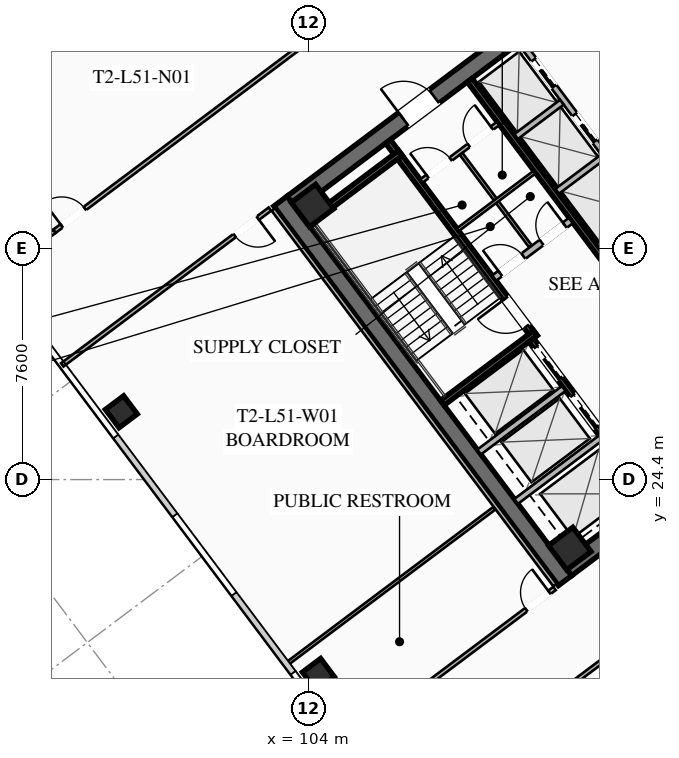
"""IFC4 building model, lengths in metres.
Left out: names, types, materials, properties, quantities, classifications, styles, units other than length and angle.
Written with IfcOpenShell. Run it as: python <this file> out.ifc"""

import sys

from ifc_helpers import new_model, si_unit, direction, frame, frame_2d, origin, origin_2d, place, context, subcontext, project, spatial, rectangle, hollow_rectangle, extrude, element, fill, save


model = new_model("IFC4")
c1 = context("Model", 3, precision=1e-05, world=origin(), true_north=direction((0.0, 1.0)))
c2 = subcontext(c1, "Body", "Model", "MODEL_VIEW")
j1 = project(units=[si_unit("LENGTHUNIT", "METRE"), si_unit("PLANEANGLEUNIT", "RADIAN")], contexts=[c1])
p1 = place(None, origin())
s1 = spatial("IfcSite", under=j1, at=p1, CompositionType="ELEMENT")
p2 = place(p1, origin())
s2 = spatial("IfcBuilding", under=s1, at=p2, CompositionType="ELEMENT")
p3 = place(p2, frame((0.0, 0.0, 188.95)))
s3 = spatial("IfcBuildingStorey", under=s2, at=p3, CompositionType="ELEMENT", Elevation=188.95)
p4 = place(p3, frame((112.436, 21.077, 0.0), z_axis=(0.0, 0.0, 1.0), x_axis=(-0.600005007985, 0.799996243986, 0.0)))
e1 = element("IfcWall", 1, at=p4, inside=s3, PredefinedType="SHEAR", context=c2, shape_type="SweptSolid", body=[
    extrude(rectangle(XDim=15.6, YDim=0.55, at=frame_2d((7.8, 0.0))), origin(), (0.0, 0.0, 1.0), 3.55),
])
p5 = place(p3, frame((124.539, 30.498, 0.0), z_axis=(0.0, 0.0, 1.0), x_axis=(-0.799998054672, -0.600002593761, 0.0)))
e2 = element("IfcWall", 2, at=p5, inside=s3, PredefinedType="SHEAR", context=c2, shape_type="SweptSolid", body=[
    extrude(rectangle(XDim=15.06, YDim=0.55, at=frame_2d((7.53, 0.0))), origin(), (0.0, 0.0, 1.0), 3.55),
])
p6 = place(p5, frame((9.23, 0.0, 0.0)))
e3 = element("IfcOpeningElement", 3, at=p6, cuts=e2, PredefinedType="OPENING", context=c2, shape_type="SweptSolid", body=[
    extrude(rectangle(XDim=1.25, YDim=2.25, at=frame_2d((0.625, 1.125))), frame((0.0, 0.285, 0.0), z_axis=(0.0, -1.0, 0.0), x_axis=(1.0, 0.0, 0.0)), (0.0, 0.0, 1.0), 0.57),
])
p7 = place(p5, frame((4.18, 0.0, 0.0)))
e4 = element("IfcOpeningElement", 4, at=p7, cuts=e2, PredefinedType="OPENING", context=c2, shape_type="SweptSolid", body=[
    extrude(rectangle(XDim=1.25, YDim=2.25, at=frame_2d((0.625, 1.125))), frame((0.0, 0.285, 0.0), z_axis=(0.0, -1.0, 0.0), x_axis=(1.0, 0.0, 0.0)), (0.0, 0.0, 1.0), 0.57),
])
p8 = place(p3, frame((103.461, 33.502, 0.0), z_axis=(0.0, 0.0, 1.0), x_axis=(0.799998054672, 0.600002593761, 0.0)))
e5 = element("IfcWall", 5, at=p8, inside=s3, PredefinedType="SHEAR", context=c2, shape_type="SweptSolid", body=[
    extrude(rectangle(XDim=15.06, YDim=0.55, at=frame_2d((7.53, 0.0))), origin(), (0.0, 0.0, 1.0), 3.55),
])
p9 = place(p8, frame((4.58, 0.0, 0.0)))
e6 = element("IfcOpeningElement", 6, at=p9, cuts=e5, PredefinedType="OPENING", context=c2, shape_type="SweptSolid", body=[
    extrude(rectangle(XDim=1.25, YDim=2.25, at=frame_2d((0.625, 1.125))), frame((0.0, 0.285, 0.0), z_axis=(0.0, -1.0, 0.0), x_axis=(1.0, 0.0, 0.0)), (0.0, 0.0, 1.0), 0.57),
])
p10 = place(p8, frame((9.63, 0.0, 0.0)))
e7 = element("IfcOpeningElement", 7, at=p10, cuts=e5, PredefinedType="OPENING", context=c2, shape_type="SweptSolid", body=[
    extrude(rectangle(XDim=1.25, YDim=2.25, at=frame_2d((0.625, 1.125))), frame((0.0, 0.285, 0.0), z_axis=(0.0, -1.0, 0.0), x_axis=(1.0, 0.0, 0.0)), (0.0, 0.0, 1.0), 0.57),
])
for number, where, z_axis, x_axis in (
    (8, (112.59, 22.13, 0.0), (0.0, 0.0, 1.0), (0.8, 0.6, 0.0)),
    (9, (104.13, 33.41, 0.0), (0.0, 0.0, 1.0), (0.8, 0.6, 0.0)),
):
    element("IfcColumn", number, at=place(p3, frame(where, z_axis=z_axis, x_axis=x_axis)), inside=s3, PredefinedType="COLUMN", context=c2, shape_type="SweptSolid", body=[
        extrude(hollow_rectangle(XDim=1.0, YDim=1.0, WallThickness=0.04, at=origin_2d()), origin(), (0.0, 0.0, 1.0), 3.37),
    ])
for number, where, z_axis, x_axis in (
    (10, (97.84, 26.63, 0.0), (0.0, 0.0, 1.0), (0.8, 0.6, 0.0)),
    (11, (104.32, 17.99, 0.0), (0.0, 0.0, 1.0), (0.8, 0.6, 0.0)),
):
    element("IfcColumn", number, at=place(p3, frame(where, z_axis=z_axis, x_axis=x_axis)), inside=s3, PredefinedType="COLUMN", context=c2, shape_type="SweptSolid", body=[
        extrude(hollow_rectangle(XDim=0.75, YDim=0.75, WallThickness=0.032, at=origin_2d()), origin(), (0.0, 0.0, 1.0), 3.37),
    ])
p11 = place(p3, frame((111.44, 29.08, 0.0), z_axis=(0.0, 0.0, 1.0), x_axis=(-0.59999029481, 0.8000072788, 0.0)))
e12 = element("IfcWall", 12, at=p11, inside=s3, PredefinedType="SHEAR", context=c2, shape_type="SweptSolid", body=[
    extrude(rectangle(XDim=8.05, YDim=0.2, at=frame_2d((4.025, 0.0))), origin(), (0.0, 0.0, 1.0), 3.37),
])
p12 = place(p11, frame((0.45, 0.0, 0.0)))
e13 = element("IfcOpeningElement", 13, at=p12, cuts=e12, PredefinedType="OPENING", context=c2, shape_type="SweptSolid", body=[
    extrude(rectangle(XDim=1.15, YDim=2.2, at=frame_2d((0.575, 1.1))), frame((0.0, 0.11, 0.0), z_axis=(0.0, -1.0, 0.0), x_axis=(1.0, 0.0, 0.0)), (0.0, 0.0, 1.0), 0.22),
])
for number, where, z_axis, x_axis in (
    (14, (108.396, 26.922, 0.0), (0.0, 0.0, 1.0), (0.8, 0.6, 0.0)),
    (15, (103.956, 32.842, 0.0), (0.0, 0.0, 1.0), (0.8, 0.6, 0.0)),
):
    element("IfcWall", number, at=place(p3, frame(where, z_axis=z_axis, x_axis=x_axis)), inside=s3, PredefinedType="SHEAR", context=c2, shape_type="SweptSolid", body=[
        extrude(rectangle(XDim=3.83, YDim=0.2, at=frame_2d((1.915, 0.0))), origin(), (0.0, 0.0, 1.0), 3.37),
    ])
p13 = place(p3, frame((117.998, 25.936, 0.0), z_axis=(0.0, 0.0, 1.0), x_axis=(-0.600002693989, 0.799997979501, 0.0)))
e16 = element("IfcWall", 16, at=p13, inside=s3, PredefinedType="SHEAR", context=c2, shape_type="SweptSolid", body=[
    extrude(rectangle(XDim=14.5, YDim=0.2, at=frame_2d((7.25, 0.0))), origin(), (0.0, 0.0, 1.0), 3.37),
])
p14 = place(p3, frame((110.104, 31.028, 0.0), z_axis=(0.0, 0.0, 1.0), x_axis=(0.800018601094, 0.59997519774, 0.0)))
e17 = element("IfcWall", 17, at=p14, inside=s3, PredefinedType="SOLIDWALL", context=c2, shape_type="SweptSolid", body=[
    extrude(rectangle(XDim=3.15, YDim=0.22, at=frame_2d((1.575, 0.0))), origin(), (0.0, 0.0, 1.0), 2.723),
])
p15 = place(p14, frame((0.25, 0.0, 0.0)))
e18 = element("IfcOpeningElement", 18, at=p15, cuts=e17, PredefinedType="OPENING", context=c2, shape_type="SweptSolid", body=[
    extrude(rectangle(XDim=0.95, YDim=2.05, at=frame_2d((0.475, 1.025))), frame((0.0, 0.12, 0.0), z_axis=(0.0, -1.0, 0.0), x_axis=(1.0, 0.0, 0.0)), (0.0, 0.0, 1.0), 0.24),
])
p16 = place(p14, frame((1.95, 0.0, 0.0)))
e19 = element("IfcOpeningElement", 19, at=p16, cuts=e17, PredefinedType="OPENING", context=c2, shape_type="SweptSolid", body=[
    extrude(rectangle(XDim=0.95, YDim=2.05, at=frame_2d((0.475, 1.025))), frame((0.0, 0.12, 0.0), z_axis=(0.0, -1.0, 0.0), x_axis=(1.0, 0.0, 0.0)), (0.0, 0.0, 1.0), 0.24),
])
p17 = place(p3, frame((115.19, 23.83, 0.0), z_axis=(0.0, 0.0, 1.0), x_axis=(-0.599993943644, 0.800004542231, 0.0)))
e20 = element("IfcWall", 20, at=p17, inside=s3, PredefinedType="SHEAR", context=c2, shape_type="SweptSolid", body=[
    extrude(rectangle(XDim=6.45, YDim=0.2, at=frame_2d((3.225, 0.0))), origin(), (0.0, 0.0, 1.0), 3.37),
])
p18 = place(p17, frame((4.875, 0.0, 0.0)))
e21 = element("IfcOpeningElement", 21, at=p18, cuts=e20, PredefinedType="OPENING", context=c2, shape_type="SweptSolid", body=[
    extrude(rectangle(XDim=1.3, YDim=2.25, at=frame_2d((0.65, 1.125))), frame((0.0, 0.11, 0.0), z_axis=(0.0, -1.0, 0.0), x_axis=(1.0, 0.0, 0.0)), (0.0, 0.0, 1.0), 0.22),
])
p19 = place(p17, frame((2.875, 0.0, 0.0)))
e22 = element("IfcOpeningElement", 22, at=p19, cuts=e20, PredefinedType="OPENING", context=c2, shape_type="SweptSolid", body=[
    extrude(rectangle(XDim=1.3, YDim=2.25, at=frame_2d((0.65, 1.125))), frame((0.0, 0.11, 0.0), z_axis=(0.0, -1.0, 0.0), x_axis=(1.0, 0.0, 0.0)), (0.0, 0.0, 1.0), 0.22),
])
p20 = place(p17, frame((0.675, 0.0, 0.0)))
e23 = element("IfcOpeningElement", 23, at=p20, cuts=e20, PredefinedType="OPENING", context=c2, shape_type="SweptSolid", body=[
    extrude(rectangle(XDim=1.3, YDim=2.25, at=frame_2d((0.65, 1.125))), frame((0.0, 0.11, 0.0), z_axis=(0.0, -1.0, 0.0), x_axis=(1.0, 0.0, 0.0)), (0.0, 0.0, 1.0), 0.22),
])
for number, where, z_axis, x_axis in (
    (24, (110.826, 23.682, 0.0), (0.0, 0.0, 1.0), (0.8, 0.6, 0.0)),
    (25, (109.608, 25.306, 0.0), (0.0, 0.0, 1.0), (0.8, 0.6, 0.0)),
):
    element("IfcWall", number, at=place(p3, frame(where, z_axis=z_axis, x_axis=x_axis)), inside=s3, PredefinedType="SOLIDWALL", context=c2, shape_type="SweptSolid", body=[
        extrude(rectangle(XDim=3.48, YDim=0.2, at=frame_2d((1.74, 0.0))), origin(), (0.0, 0.0, 1.0), 3.37),
    ])
p21 = place(p3, frame((112.81, 40.17, 0.0), z_axis=(0.0, 0.0, 1.0), x_axis=(0.599993943644, -0.800004542231, 0.0)))
e26 = element("IfcWall", 26, at=p21, inside=s3, PredefinedType="SHEAR", context=c2, shape_type="SweptSolid", body=[
    extrude(rectangle(XDim=6.45, YDim=0.2, at=frame_2d((3.225, 0.0))), origin(), (0.0, 0.0, 1.0), 3.37),
])
p22 = place(p3, frame((107.71, 34.22, 0.0), z_axis=(0.0, 0.0, 1.0), x_axis=(0.799981399002, 0.60002480053, 0.0)))
e27 = element("IfcWall", 27, at=p22, inside=s3, PredefinedType="PARTITIONING", context=c2, shape_type="SweptSolid", body=[
    extrude(rectangle(XDim=3.15, YDim=0.135, at=frame_2d((1.575, 0.0))), origin(), (0.0, 0.0, 1.0), 2.723),
])
p23 = place(p22, frame((0.25, 0.0, 0.0)))
e28 = element("IfcOpeningElement", 28, at=p23, cuts=e27, PredefinedType="OPENING", context=c2, shape_type="SweptSolid", body=[
    extrude(rectangle(XDim=0.95, YDim=2.05, at=frame_2d((0.475, 1.025))), frame((0.0, 0.077, 0.0), z_axis=(0.0, -1.0, 0.0), x_axis=(1.0, 0.0, 0.0)), (0.0, 0.0, 1.0), 0.155),
])
p24 = place(p22, frame((1.95, 0.0, 0.0)))
e29 = element("IfcOpeningElement", 29, at=p24, cuts=e27, PredefinedType="OPENING", context=c2, shape_type="SweptSolid", body=[
    extrude(rectangle(XDim=0.95, YDim=2.05, at=frame_2d((0.475, 1.025))), frame((0.0, 0.077, 0.0), z_axis=(0.0, -1.0, 0.0), x_axis=(1.0, 0.0, 0.0)), (0.0, 0.0, 1.0), 0.155),
])
p25 = place(p3, frame((111.296, 32.072, 0.0), z_axis=(0.0, 0.0, 1.0), x_axis=(-0.59995887973, 0.800030838552, 0.0)))
e30 = element("IfcWall", 30, at=p25, inside=s3, PredefinedType="PARTITIONING", context=c2, shape_type="SweptSolid", body=[
    extrude(rectangle(XDim=3.8, YDim=0.11, at=frame_2d((1.9, 0.0))), origin(), (0.0, 0.0, 1.0), 2.723),
])
p26 = place(p3, frame((108.91, 32.62, 0.0), z_axis=(0.0, 0.0, 1.0), x_axis=(0.800018601094, 0.59997519774, 0.0)))
e31 = element("IfcWall", 31, at=p26, inside=s3, PredefinedType="PARTITIONING", context=c2, shape_type="SweptSolid", body=[
    extrude(rectangle(XDim=3.15, YDim=0.11, at=frame_2d((1.575, 0.0))), origin(), (0.0, 0.0, 1.0), 2.723),
])
p27 = place(p3, frame((115.11, 33.27, 0.0), z_axis=(0.0, 0.0, 1.0), x_axis=(-0.600011322243, 0.799991508192, 0.0)))
e32 = element("IfcWall", 32, at=p27, inside=s3, PredefinedType="SOLIDWALL", context=c2, shape_type="SweptSolid", body=[
    extrude(rectangle(XDim=6.9, YDim=0.2, at=frame_2d((3.45, 0.0))), origin(), (0.0, 0.0, 1.0), 3.37),
])
p28 = place(p27, frame((0.575, 0.0, 0.0)))
e33 = element("IfcOpeningElement", 33, at=p28, cuts=e32, PredefinedType="OPENING", context=c2, shape_type="SweptSolid", body=[
    extrude(rectangle(XDim=1.1, YDim=2.2, at=frame_2d((0.55, 1.1))), frame((0.0, 0.11, 0.0), z_axis=(0.0, -1.0, 0.0), x_axis=(1.0, 0.0, 0.0)), (0.0, 0.0, 1.0), 0.22),
])
p29 = place(p27, frame((2.825, 0.0, 0.0)))
e34 = element("IfcOpeningElement", 34, at=p29, cuts=e32, PredefinedType="OPENING", context=c2, shape_type="SweptSolid", body=[
    extrude(rectangle(XDim=1.1, YDim=2.2, at=frame_2d((0.55, 1.1))), frame((0.0, 0.11, 0.0), z_axis=(0.0, -1.0, 0.0), x_axis=(1.0, 0.0, 0.0)), (0.0, 0.0, 1.0), 0.22),
])
p30 = place(p27, frame((5.075, 0.0, 0.0)))
e35 = element("IfcOpeningElement", 35, at=p30, cuts=e32, PredefinedType="OPENING", context=c2, shape_type="SweptSolid", body=[
    extrude(rectangle(XDim=1.1, YDim=2.2, at=frame_2d((0.55, 1.1))), frame((0.0, 0.11, 0.0), z_axis=(0.0, -1.0, 0.0), x_axis=(1.0, 0.0, 0.0)), (0.0, 0.0, 1.0), 0.22),
])
p31 = place(p3, frame((113.526, 32.082, 0.0), z_axis=(0.0, 0.0, 1.0), x_axis=(0.800046745961, 0.599937666993, 0.0)))
e36 = element("IfcWall", 36, at=p31, inside=s3, PredefinedType="SOLIDWALL", context=c2, shape_type="SweptSolid", body=[
    extrude(rectangle(XDim=1.88, YDim=0.2, at=frame_2d((0.94, 0.0))), origin(), (0.0, 0.0, 1.0), 3.37),
])
p32 = place(p3, frame((112.176, 33.882, 0.0), z_axis=(0.0, 0.0, 1.0), x_axis=(0.8, 0.6, 0.0)))
e37 = element("IfcWall", 37, at=p32, inside=s3, PredefinedType="SOLIDWALL", context=c2, shape_type="SweptSolid", body=[
    extrude(rectangle(XDim=1.88, YDim=0.2, at=frame_2d((0.94, 0.0))), origin(), (0.0, 0.0, 1.0), 3.37),
])
p33 = place(p3, frame((110.826, 35.682, 0.0), z_axis=(0.0, 0.0, 1.0), x_axis=(0.799984418148, 0.600020775241, 0.0)))
e38 = element("IfcWall", 38, at=p33, inside=s3, PredefinedType="SOLIDWALL", context=c2, shape_type="SweptSolid", body=[
    extrude(rectangle(XDim=1.88, YDim=0.2, at=frame_2d((0.94, 0.0))), origin(), (0.0, 0.0, 1.0), 3.37),
])
p34 = place(p3, frame((95.638, 32.566, 0.0), z_axis=(0.0, 0.0, 1.0), x_axis=(0.8, 0.6, 0.0)))
e39 = element("IfcWall", 39, at=p34, inside=s3, PredefinedType="PARTITIONING", context=c2, shape_type="SweptSolid", body=[
    extrude(rectangle(XDim=28.7, YDim=0.135, at=frame_2d((14.35, 0.0))), origin(), (0.0, 0.0, 1.0), 2.723),
])
p35 = place(p34, frame((0.3, 0.0, 0.0)))
e40 = element("IfcOpeningElement", 40, at=p35, cuts=e39, PredefinedType="OPENING", context=c2, shape_type="SweptSolid", body=[
    extrude(rectangle(XDim=0.95, YDim=2.05, at=frame_2d((0.475, 1.025))), frame((0.0, 0.077, 0.0), z_axis=(0.0, -1.0, 0.0), x_axis=(1.0, 0.0, 0.0)), (0.0, 0.0, 1.0), 0.155),
])
p36 = place(p34, frame((14.083, 0.0, 0.0)))
e41 = element("IfcOpeningElement", 41, at=p36, cuts=e39, PredefinedType="OPENING", context=c2, shape_type="SweptSolid", body=[
    extrude(rectangle(XDim=0.95, YDim=2.05, at=frame_2d((0.475, 1.025))), frame((0.0, 0.077, 0.0), z_axis=(0.0, -1.0, 0.0), x_axis=(1.0, 0.0, 0.0)), (0.0, 0.0, 1.0), 0.155),
])
p37 = place(p34, frame((27.45, 0.0, 0.0)))
e42 = element("IfcOpeningElement", 42, at=p37, cuts=e39, PredefinedType="OPENING", context=c2, shape_type="SweptSolid", body=[
    extrude(rectangle(XDim=0.95, YDim=2.05, at=frame_2d((0.475, 1.025))), frame((0.0, 0.077, 0.0), z_axis=(0.0, -1.0, 0.0), x_axis=(1.0, 0.0, 0.0)), (0.0, 0.0, 1.0), 0.155),
])
p38 = place(p3, frame((93.694, 31.108, 0.0), z_axis=(0.0, 0.0, 1.0), x_axis=(0.799975885537, 0.600032151272, 0.0)))
e43 = element("IfcWall", 43, at=p38, inside=s3, PredefinedType="PARTITIONING", context=c2, shape_type="SweptSolid", body=[
    extrude(rectangle(XDim=2.43, YDim=0.135, at=frame_2d((1.215, 0.0))), origin(), (0.0, 0.0, 1.0), 2.723),
])
p39 = place(p3, frame((131.87, 32.09, 0.0), z_axis=(0.0, 0.0, 1.0), x_axis=(-0.800003062365, -0.599995916825, 0.0)))
e44 = element("IfcWall", 44, at=p39, inside=s3, PredefinedType="PARTITIONING", context=c2, shape_type="SweptSolid", body=[
    extrude(rectangle(XDim=28.7, YDim=0.135, at=frame_2d((14.35, 0.0))), origin(), (0.0, 0.0, 1.0), 2.723),
])
p40 = place(p39, frame((27.37, 0.0, 0.0)))
e45 = element("IfcOpeningElement", 45, at=p40, cuts=e44, PredefinedType="OPENING", context=c2, shape_type="SweptSolid", body=[
    extrude(rectangle(XDim=0.95, YDim=2.05, at=frame_2d((0.475, 1.025))), frame((0.0, 0.077, 0.0), z_axis=(0.0, -1.0, 0.0), x_axis=(1.0, 0.0, 0.0)), (0.0, 0.0, 1.0), 0.155),
])
p41 = place(p39, frame((13.638, 0.0, 0.0)))
e46 = element("IfcOpeningElement", 46, at=p41, cuts=e44, PredefinedType="OPENING", context=c2, shape_type="SweptSolid", body=[
    extrude(rectangle(XDim=0.95, YDim=2.05, at=frame_2d((0.475, 1.025))), frame((0.0, 0.077, 0.0), z_axis=(0.0, -1.0, 0.0), x_axis=(1.0, 0.0, 0.0)), (0.0, 0.0, 1.0), 0.155),
])
p42 = place(p39, frame((0.38, 0.0, 0.0)))
e47 = element("IfcOpeningElement", 47, at=p42, cuts=e44, PredefinedType="OPENING", context=c2, shape_type="SweptSolid", body=[
    extrude(rectangle(XDim=0.95, YDim=2.05, at=frame_2d((0.475, 1.025))), frame((0.0, 0.077, 0.0), z_axis=(0.0, -1.0, 0.0), x_axis=(1.0, 0.0, 0.0)), (0.0, 0.0, 1.0), 0.155),
])
p43 = place(p3, frame((112.104, 20.928, 0.0), z_axis=(0.0, 0.0, 1.0), x_axis=(-0.599994940075, 0.800003794918, 0.0)))
e48 = element("IfcWall", 48, at=p43, inside=s3, PredefinedType="PARTITIONING", context=c2, shape_type="SweptSolid", body=[
    extrude(rectangle(XDim=15.44, YDim=0.135, at=frame_2d((7.72, 0.0))), origin(), (0.0, 0.0, 1.0), 2.723),
])
p44 = place(p3, frame((102.728, 33.296, 0.0), z_axis=(0.0, 0.0, 1.0), x_axis=(-0.800013722153, -0.59998170336, 0.0)))
e49 = element("IfcWall", 49, at=p44, inside=s3, PredefinedType="PARTITIONING", context=c2, shape_type="SweptSolid", body=[
    extrude(rectangle(XDim=8.54, YDim=0.135, at=frame_2d((4.27, 0.0))), origin(), (0.0, 0.0, 1.0), 2.723),
])
p45 = place(p44, frame((0.5, 0.0, 0.0)))
e50 = element("IfcOpeningElement", 50, at=p45, cuts=e49, PredefinedType="OPENING", context=c2, shape_type="SweptSolid", body=[
    extrude(rectangle(XDim=0.95, YDim=2.05, at=frame_2d((0.475, 1.025))), frame((0.0, 0.077, 0.0), z_axis=(0.0, -1.0, 0.0), x_axis=(1.0, 0.0, 0.0)), (0.0, 0.0, 1.0), 0.155),
])
p46 = place(p3, frame((105.256, 15.692, 0.0), z_axis=(0.0, 0.0, 1.0), x_axis=(0.799989708052, 0.600013722352, 0.0)))
e51 = element("IfcWall", 51, at=p46, inside=s3, PredefinedType="PARTITIONING", context=c2, shape_type="SweptSolid", body=[
    extrude(rectangle(XDim=8.54, YDim=0.135, at=frame_2d((4.27, 0.0))), origin(), (0.0, 0.0, 1.0), 2.723),
])
p47 = place(p46, frame((7.38, 0.0, 0.0)))
e52 = element("IfcOpeningElement", 52, at=p47, cuts=e51, PredefinedType="OPENING", context=c2, shape_type="SweptSolid", body=[
    extrude(rectangle(XDim=0.95, YDim=2.05, at=frame_2d((0.475, 1.025))), frame((0.0, 0.077, 0.0), z_axis=(0.0, -1.0, 0.0), x_axis=(1.0, 0.0, 0.0)), (0.0, 0.0, 1.0), 0.155),
])
p48 = place(p3, frame((103.276, 18.332, 0.0), z_axis=(0.0, 0.0, 1.0), x_axis=(0.8, 0.6, 0.0)))
e53 = element("IfcWall", 53, at=p48, inside=s3, PredefinedType="PARTITIONING", context=c2, shape_type="SweptSolid", body=[
    extrude(rectangle(XDim=8.54, YDim=0.11, at=frame_2d((4.27, 0.0))), origin(), (0.0, 0.0, 1.0), 2.723),
])
p49 = place(p9, origin())
e54 = element("IfcDoor", 54, at=p49, inside=s3, OperationType="SINGLE_SWING_LEFT", PredefinedType="DOOR", context=c2, shape_type="SweptSolid", body=[
    extrude(rectangle(XDim=1.25, YDim=2.25, at=frame_2d((0.625, 1.125))), frame((0.0, 0.025, 0.0), z_axis=(0.0, -1.0, 0.0), x_axis=(1.0, 0.0, 0.0)), (0.0, 0.0, 1.0), 0.05),
])
fill(e6, e54)
p50 = place(p12, origin())
e55 = element("IfcDoor", 55, at=p50, inside=s3, OperationType="SINGLE_SWING_RIGHT", PredefinedType="DOOR", context=c2, shape_type="SweptSolid", body=[
    extrude(rectangle(XDim=1.15, YDim=2.2, at=frame_2d((0.575, 1.1))), frame((0.0, 0.025, 0.0), z_axis=(0.0, -1.0, 0.0), x_axis=(1.0, 0.0, 0.0)), (0.0, 0.0, 1.0), 0.05),
])
fill(e13, e55)
p51 = place(p23, origin())
e56 = element("IfcDoor", 56, at=p51, inside=s3, OperationType="SINGLE_SWING_LEFT", PredefinedType="DOOR", context=c2, shape_type="SweptSolid", body=[
    extrude(rectangle(XDim=0.95, YDim=2.05, at=frame_2d((0.475, 1.025))), frame((0.0, 0.025, 0.0), z_axis=(0.0, -1.0, 0.0), x_axis=(1.0, 0.0, 0.0)), (0.0, 0.0, 1.0), 0.05),
])
fill(e28, e56)
p52 = place(p24, origin())
e57 = element("IfcDoor", 57, at=p52, inside=s3, OperationType="SINGLE_SWING_RIGHT", PredefinedType="DOOR", context=c2, shape_type="SweptSolid", body=[
    extrude(rectangle(XDim=0.95, YDim=2.05, at=frame_2d((0.475, 1.025))), frame((0.0, 0.025, 0.0), z_axis=(0.0, -1.0, 0.0), x_axis=(1.0, 0.0, 0.0)), (0.0, 0.0, 1.0), 0.05),
])
fill(e29, e57)
p53 = place(p15, origin())
e58 = element("IfcDoor", 58, at=p53, inside=s3, OperationType="SINGLE_SWING_LEFT", PredefinedType="DOOR", context=c2, shape_type="SweptSolid", body=[
    extrude(rectangle(XDim=0.95, YDim=2.05, at=frame_2d((0.475, 1.025))), frame((0.0, 0.025, 0.0), z_axis=(0.0, -1.0, 0.0), x_axis=(1.0, 0.0, 0.0)), (0.0, 0.0, 1.0), 0.05),
])
fill(e18, e58)
p54 = place(p16, origin())
e59 = element("IfcDoor", 59, at=p54, inside=s3, OperationType="SINGLE_SWING_RIGHT", PredefinedType="DOOR", context=c2, shape_type="SweptSolid", body=[
    extrude(rectangle(XDim=0.95, YDim=2.05, at=frame_2d((0.475, 1.025))), frame((0.0, 0.025, 0.0), z_axis=(0.0, -1.0, 0.0), x_axis=(1.0, 0.0, 0.0)), (0.0, 0.0, 1.0), 0.05),
])
fill(e19, e59)
p55 = place(p35, origin())
e60 = element("IfcDoor", 60, at=p55, inside=s3, OperationType="SINGLE_SWING_LEFT", PredefinedType="DOOR", context=c2, shape_type="SweptSolid", body=[
    extrude(rectangle(XDim=0.95, YDim=2.05, at=frame_2d((0.475, 1.025))), frame((0.0, 0.025, 0.0), z_axis=(0.0, -1.0, 0.0), x_axis=(1.0, 0.0, 0.0)), (0.0, 0.0, 1.0), 0.05),
])
fill(e40, e60)
p56 = place(p45, origin())
e61 = element("IfcDoor", 61, at=p56, inside=s3, OperationType="SINGLE_SWING_LEFT", PredefinedType="DOOR", context=c2, shape_type="SweptSolid", body=[
    extrude(rectangle(XDim=0.95, YDim=2.05, at=frame_2d((0.475, 1.025))), frame((0.0, 0.025, 0.0), z_axis=(0.0, -1.0, 0.0), x_axis=(1.0, 0.0, 0.0)), (0.0, 0.0, 1.0), 0.05),
])
fill(e50, e61)
p57 = place(p47, origin())
e62 = element("IfcDoor", 62, at=p57, inside=s3, OperationType="SINGLE_SWING_RIGHT", PredefinedType="DOOR", context=c2, shape_type="SweptSolid", body=[
    extrude(rectangle(XDim=0.95, YDim=2.05, at=frame_2d((0.475, 1.025))), frame((0.0, 0.025, 0.0), z_axis=(0.0, -1.0, 0.0), x_axis=(1.0, 0.0, 0.0)), (0.0, 0.0, 1.0), 0.05),
])
fill(e52, e62)
p58 = place(p18, origin())
e63 = element("IfcDoor", 63, at=p58, inside=s3, OperationType="SLIDING_TO_LEFT", PredefinedType="DOOR", context=c2, shape_type="SweptSolid", body=[
    extrude(rectangle(XDim=1.3, YDim=2.25, at=frame_2d((0.65, 1.125))), frame((0.0, 0.025, 0.0), z_axis=(0.0, -1.0, 0.0), x_axis=(1.0, 0.0, 0.0)), (0.0, 0.0, 1.0), 0.05),
])
fill(e21, e63)
p59 = place(p19, origin())
e64 = element("IfcDoor", 64, at=p59, inside=s3, OperationType="SLIDING_TO_LEFT", PredefinedType="DOOR", context=c2, shape_type="SweptSolid", body=[
    extrude(rectangle(XDim=1.3, YDim=2.25, at=frame_2d((0.65, 1.125))), frame((0.0, 0.025, 0.0), z_axis=(0.0, -1.0, 0.0), x_axis=(1.0, 0.0, 0.0)), (0.0, 0.0, 1.0), 0.05),
])
fill(e22, e64)
p60 = place(p29, origin())
e65 = element("IfcDoor", 65, at=p60, inside=s3, OperationType="SLIDING_TO_LEFT", PredefinedType="DOOR", context=c2, shape_type="SweptSolid", body=[
    extrude(rectangle(XDim=1.1, YDim=2.2, at=frame_2d((0.55, 1.1))), frame((0.0, 0.025, 0.0), z_axis=(0.0, -1.0, 0.0), x_axis=(1.0, 0.0, 0.0)), (0.0, 0.0, 1.0), 0.05),
])
fill(e34, e65)
p61 = place(p30, origin())
e66 = element("IfcDoor", 66, at=p61, inside=s3, OperationType="SLIDING_TO_LEFT", PredefinedType="DOOR", context=c2, shape_type="SweptSolid", body=[
    extrude(rectangle(XDim=1.1, YDim=2.2, at=frame_2d((0.55, 1.1))), frame((0.0, 0.025, 0.0), z_axis=(0.0, -1.0, 0.0), x_axis=(1.0, 0.0, 0.0)), (0.0, 0.0, 1.0), 0.05),
])
fill(e35, e66)
save(model, sys.argv[1])
